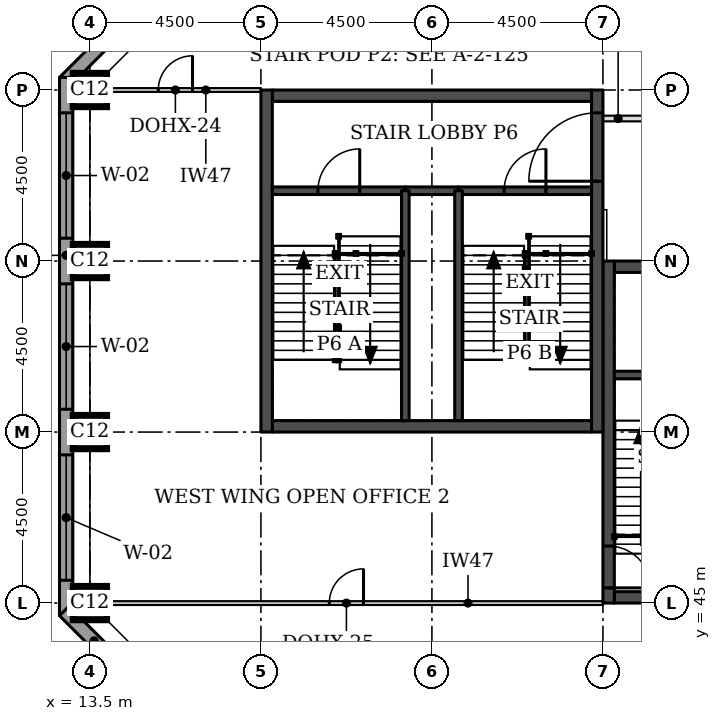
"""IFC4 building model, lengths in metres.
Left out: names, types, materials, properties, quantities, classifications, styles, units other than length and angle.
Written with IfcOpenShell. Run it as: python <this file> out.ifc"""

import sys

from ifc_helpers import new_model, si_unit, direction, frame, frame_2d, origin, origin_2d, place, context, subcontext, project, spatial, rectangle, extrude, element, fill, save


model = new_model("IFC4")
c1 = context("Model", 3, precision=1e-05, world=origin(), true_north=direction((0.0, 1.0)))
c2 = subcontext(c1, "Body", "Model", "MODEL_VIEW")
j1 = project(units=[si_unit("LENGTHUNIT", "METRE"), si_unit("PLANEANGLEUNIT", "RADIAN")], contexts=[c1])
p1 = place(None, origin())
s1 = spatial("IfcSite", under=j1, at=p1, CompositionType="ELEMENT")
p2 = place(p1, origin())
s2 = spatial("IfcBuilding", under=s1, at=p2, CompositionType="ELEMENT")
p3 = place(p2, frame((0.0, 0.0, 256.3)))
s3 = spatial("IfcBuildingStorey", under=s2, at=p3, CompositionType="ELEMENT", Elevation=256.3)
for number, where, z_axis, x_axis in (
    (1, (13.5, 45.0, 0.0), (0.0, 0.0, 1.0), (1.0, 0.0, 0.0)),
    (2, (13.5, 49.5, 0.0), (0.0, 0.0, 1.0), (1.0, 0.0, 0.0)),
    (3, (13.5, 54.0, 0.0), (0.0, 0.0, 1.0), (1.0, 0.0, 0.0)),
    (4, (13.5, 58.5, 0.0), (0.0, 0.0, 1.0), (1.0, 0.0, 0.0)),
):
    element("IfcColumn", number, at=place(p3, frame(where, z_axis=z_axis, x_axis=x_axis)), inside=s3, PredefinedType="COLUMN", context=c2, shape_type="SweptSolid", body=[
        extrude(rectangle(XDim=0.9, YDim=0.9, at=origin_2d()), origin(), (0.0, 0.0, 1.0), 3.7),
    ])
p4 = place(p3, frame((27.3, 45.15, 0.0), z_axis=(0.0, 0.0, 1.0), x_axis=(1.0, 0.0, 0.0)))
e5 = element("IfcWall", 5, at=p4, inside=s3, PredefinedType="SHEAR", context=c2, shape_type="SweptSolid", body=[
    extrude(rectangle(XDim=8.4, YDim=0.3, at=frame_2d((4.2, 0.0))), origin(), (0.0, 0.0, 1.0), 3.7),
])
p5 = place(p4, frame((5.2, 0.0, 0.0)))
e6 = element("IfcOpeningElement", 6, at=p5, cuts=e5, PredefinedType="OPENING", context=c2, shape_type="SweptSolid", body=[
    extrude(rectangle(XDim=1.0, YDim=2.1, at=frame_2d((0.5, 1.05))), frame((0.0, 0.16, 0.0), z_axis=(0.0, -1.0, 0.0), x_axis=(1.0, 0.0, 0.0)), (0.0, 0.0, 1.0), 0.32),
])
p6 = place(p3, frame((27.3, 53.85, 0.0), z_axis=(0.0, 0.0, 1.0), x_axis=(1.0, 0.0, 0.0)))
e7 = element("IfcWall", 7, at=p6, inside=s3, PredefinedType="SHEAR", context=c2, shape_type="SweptSolid", body=[
    extrude(rectangle(XDim=8.4, YDim=0.3, at=frame_2d((4.2, 0.0))), origin(), (0.0, 0.0, 1.0), 3.7),
])
p7 = place(p6, frame((6.4, 0.0, 0.0)))
e8 = element("IfcOpeningElement", 8, at=p7, cuts=e7, PredefinedType="OPENING", context=c2, shape_type="SweptSolid", body=[
    extrude(rectangle(XDim=1.1, YDim=2.1, at=frame_2d((0.55, 1.05))), frame((0.0, 0.16, 0.0), z_axis=(0.0, -1.0, 0.0), x_axis=(1.0, 0.0, 0.0)), (0.0, 0.0, 1.0), 0.32),
])
p8 = place(p3, frame((27.15, 45.0, 0.0), z_axis=(0.0, 0.0, 1.0), x_axis=(0.0, 1.0, 0.0)))
e9 = element("IfcWall", 9, at=p8, inside=s3, PredefinedType="SHEAR", context=c2, shape_type="SweptSolid", body=[
    extrude(rectangle(XDim=9.0, YDim=0.3, at=frame_2d((4.5, 0.0))), origin(), (0.0, 0.0, 1.0), 3.7),
])
p9 = place(p8, frame((0.4, 0.0, 0.0)))
e10 = element("IfcOpeningElement", 10, at=p9, cuts=e9, PredefinedType="OPENING", context=c2, shape_type="SweptSolid", body=[
    extrude(rectangle(XDim=1.1, YDim=2.1, at=frame_2d((0.55, 1.05))), frame((0.0, 0.16, 0.0), z_axis=(0.0, -1.0, 0.0), x_axis=(1.0, 0.0, 0.0)), (0.0, 0.0, 1.0), 0.32),
])
for number, where, z_axis, x_axis in (
    (11, (18.3, 49.65, 0.0), (0.0, 0.0, 1.0), (1.0, 0.0, 0.0)),
    (12, (18.3, 58.35, 0.0), (0.0, 0.0, 1.0), (1.0, 0.0, 0.0)),
):
    element("IfcWall", number, at=place(p3, frame(where, z_axis=z_axis, x_axis=x_axis)), inside=s3, PredefinedType="SHEAR", context=c2, shape_type="SweptSolid", body=[
        extrude(rectangle(XDim=8.4, YDim=0.3, at=frame_2d((4.2, 0.0))), origin(), (0.0, 0.0, 1.0), 3.7),
    ])
p10 = place(p3, frame((18.15, 49.5, 0.0), z_axis=(0.0, 0.0, 1.0), x_axis=(0.0, 1.0, 0.0)))
e13 = element("IfcWall", 13, at=p10, inside=s3, PredefinedType="SHEAR", context=c2, shape_type="SweptSolid", body=[
    extrude(rectangle(XDim=9.0, YDim=0.3, at=frame_2d((4.5, 0.0))), origin(), (0.0, 0.0, 1.0), 3.7),
])
p11 = place(p3, frame((26.85, 49.5, 0.0), z_axis=(0.0, 0.0, 1.0), x_axis=(0.0, 1.0, 0.0)))
e14 = element("IfcWall", 14, at=p11, inside=s3, PredefinedType="SHEAR", context=c2, shape_type="SweptSolid", body=[
    extrude(rectangle(XDim=9.0, YDim=0.3, at=frame_2d((4.5, 0.0))), origin(), (0.0, 0.0, 1.0), 3.7),
])
p12 = place(p11, frame((6.6, 0.0, 0.0)))
e15 = element("IfcOpeningElement", 15, at=p12, cuts=e14, PredefinedType="OPENING", context=c2, shape_type="SweptSolid", body=[
    extrude(rectangle(XDim=1.8, YDim=2.1, at=frame_2d((0.9, 1.05))), frame((0.0, 0.16, 0.0), z_axis=(0.0, -1.0, 0.0), x_axis=(1.0, 0.0, 0.0)), (0.0, 0.0, 1.0), 0.32),
])
p13 = place(p3, frame((17.792, 63.676, 0.0), z_axis=(0.0, 0.0, 1.0), x_axis=(-0.707106781187, -0.707106781187, 0.0)))
e16 = element("IfcWall", 16, at=p13, inside=s3, PredefinedType="STANDARD", context=c2, shape_type="SweptSolid", body=[
    extrude(rectangle(XDim=7.027, YDim=0.35, at=frame_2d((3.513, 0.0))), origin(), (0.0, 0.0, 1.0), 3.525),
])
p14 = place(p13, frame((1.863, 0.0, 0.9)))
e17 = element("IfcOpeningElement", 17, at=p14, cuts=e16, PredefinedType="OPENING", context=c2, shape_type="SweptSolid", body=[
    extrude(rectangle(XDim=3.3, YDim=1.9, at=frame_2d((1.65, 0.95))), frame((0.0, 0.185, 0.0), z_axis=(0.0, -1.0, 0.0), x_axis=(1.0, 0.0, 0.0)), (0.0, 0.0, 1.0), 0.37),
])
p15 = place(p3, frame((12.875, 58.831, 0.0), z_axis=(0.0, 0.0, 1.0), x_axis=(0.0, -1.0, 0.0)))
e18 = element("IfcWall", 18, at=p15, inside=s3, PredefinedType="STANDARD", context=c2, shape_type="SweptSolid", body=[
    extrude(rectangle(XDim=14.163, YDim=0.35, at=frame_2d((7.081, 0.0))), origin(), (0.0, 0.0, 1.0), 3.525),
])
p16 = place(p15, frame((0.931, 0.0, 0.9)))
e19 = element("IfcOpeningElement", 19, at=p16, cuts=e18, PredefinedType="OPENING", context=c2, shape_type="SweptSolid", body=[
    extrude(rectangle(XDim=3.3, YDim=1.9, at=frame_2d((1.65, 0.95))), frame((0.0, 0.185, 0.0), z_axis=(0.0, -1.0, 0.0), x_axis=(1.0, 0.0, 0.0)), (0.0, 0.0, 1.0), 0.37),
])
p17 = place(p15, frame((5.431, 0.0, 0.9)))
e20 = element("IfcOpeningElement", 20, at=p17, cuts=e18, PredefinedType="OPENING", context=c2, shape_type="SweptSolid", body=[
    extrude(rectangle(XDim=3.3, YDim=1.9, at=frame_2d((1.65, 0.95))), frame((0.0, 0.185, 0.0), z_axis=(0.0, -1.0, 0.0), x_axis=(1.0, 0.0, 0.0)), (0.0, 0.0, 1.0), 0.37),
])
p18 = place(p15, frame((9.931, 0.0, 0.9)))
e21 = element("IfcOpeningElement", 21, at=p18, cuts=e18, PredefinedType="OPENING", context=c2, shape_type="SweptSolid", body=[
    extrude(rectangle(XDim=3.3, YDim=1.9, at=frame_2d((1.65, 0.95))), frame((0.0, 0.185, 0.0), z_axis=(0.0, -1.0, 0.0), x_axis=(1.0, 0.0, 0.0)), (0.0, 0.0, 1.0), 0.37),
])
p19 = place(p3, frame((12.824, 44.792, 0.0), z_axis=(0.0, 0.0, 1.0), x_axis=(0.707106781187, -0.707106781187, 0.0)))
e22 = element("IfcWall", 22, at=p19, inside=s3, PredefinedType="STANDARD", context=c2, shape_type="SweptSolid", body=[
    extrude(rectangle(XDim=7.027, YDim=0.35, at=frame_2d((3.513, 0.0))), origin(), (0.0, 0.0, 1.0), 3.525),
])
p20 = place(p19, frame((1.863, 0.0, 0.9)))
e23 = element("IfcOpeningElement", 23, at=p20, cuts=e22, PredefinedType="OPENING", context=c2, shape_type="SweptSolid", body=[
    extrude(rectangle(XDim=3.3, YDim=1.9, at=frame_2d((1.65, 0.95))), frame((0.0, 0.185, 0.0), z_axis=(0.0, -1.0, 0.0), x_axis=(1.0, 0.0, 0.0)), (0.0, 0.0, 1.0), 0.37),
])
p21 = place(p3, frame((13.5, 58.5, 0.0), z_axis=(0.0, 0.0, 1.0), x_axis=(1.0, 0.0, 0.0)))
e24 = element("IfcWall", 24, at=p21, inside=s3, PredefinedType="PARTITIONING", context=c2, shape_type="SweptSolid", body=[
    extrude(rectangle(XDim=4.5, YDim=0.1, at=frame_2d((2.25, 0.0))), origin(), (0.0, 0.0, 1.0), 2.55),
])
p22 = place(p21, frame((1.8, 0.0, 0.0)))
e25 = element("IfcOpeningElement", 25, at=p22, cuts=e24, PredefinedType="OPENING", context=c2, shape_type="SweptSolid", body=[
    extrude(rectangle(XDim=0.9, YDim=2.1, at=frame_2d((0.45, 1.05))), frame((0.0, 0.06, 0.0), z_axis=(0.0, -1.0, 0.0), x_axis=(1.0, 0.0, 0.0)), (0.0, 0.0, 1.0), 0.12),
])
p23 = place(p3, frame((13.5, 45.0, 0.0), z_axis=(0.0, 0.0, 1.0), x_axis=(1.0, 0.0, 0.0)))
e26 = element("IfcWall", 26, at=p23, inside=s3, PredefinedType="PARTITIONING", context=c2, shape_type="SweptSolid", body=[
    extrude(rectangle(XDim=13.5, YDim=0.1, at=frame_2d((6.75, 0.0))), origin(), (0.0, 0.0, 1.0), 2.55),
])
p24 = place(p23, frame((6.3, 0.0, 0.0)))
e27 = element("IfcOpeningElement", 27, at=p24, cuts=e26, PredefinedType="OPENING", context=c2, shape_type="SweptSolid", body=[
    extrude(rectangle(XDim=0.9, YDim=2.1, at=frame_2d((0.45, 1.05))), frame((0.0, 0.06, 0.0), z_axis=(0.0, -1.0, 0.0), x_axis=(1.0, 0.0, 0.0)), (0.0, 0.0, 1.0), 0.12),
])
p25 = place(p3, frame((27.0, 57.75, 0.0), z_axis=(0.0, 0.0, 1.0), x_axis=(1.0, 0.0, 0.0)))
e28 = element("IfcWall", 28, at=p25, inside=s3, PredefinedType="PARTITIONING", context=c2, shape_type="SweptSolid", body=[
    extrude(rectangle(XDim=2.4, YDim=0.15, at=frame_2d((1.2, 0.0))), origin(), (0.0, 0.0, 1.0), 3.55),
])
p26 = place(p3, frame((27.3, 51.0, 0.0), z_axis=(0.0, 0.0, 1.0), x_axis=(1.0, 0.0, 0.0)))
e29 = element("IfcWall", 29, at=p26, inside=s3, PredefinedType="SOLIDWALL", context=c2, shape_type="SweptSolid", body=[
    extrude(rectangle(XDim=3.0, YDim=0.2, at=frame_2d((1.5, 0.0))), origin(), (0.0, 0.0, 1.0), 3.55),
])
p27 = place(p3, frame((21.8, 55.85, 0.0), z_axis=(0.0, 0.0, 1.0), x_axis=(1.0, 0.0, 0.0)))
e30 = element("IfcWall", 30, at=p27, inside=s3, PredefinedType="SOLIDWALL", context=c2, shape_type="SweptSolid", body=[
    extrude(rectangle(XDim=1.4, YDim=0.2, at=frame_2d((0.7, 0.0))), origin(), (0.0, 0.0, 1.0), 3.55),
])
p28 = place(p3, frame((18.3, 55.85, 0.0), z_axis=(0.0, 0.0, 1.0), x_axis=(1.0, 0.0, 0.0)))
e31 = element("IfcWall", 31, at=p28, inside=s3, PredefinedType="SOLIDWALL", context=c2, shape_type="SweptSolid", body=[
    extrude(rectangle(XDim=3.5, YDim=0.2, at=frame_2d((1.75, 0.0))), origin(), (0.0, 0.0, 1.0), 3.55),
])
p29 = place(p28, frame((1.2, 0.0, 0.0)))
e32 = element("IfcOpeningElement", 32, at=p29, cuts=e31, PredefinedType="OPENING", context=c2, shape_type="SweptSolid", body=[
    extrude(rectangle(XDim=1.1, YDim=2.1, at=frame_2d((0.55, 1.05))), frame((0.0, 0.11, 0.0), z_axis=(0.0, -1.0, 0.0), x_axis=(1.0, 0.0, 0.0)), (0.0, 0.0, 1.0), 0.22),
])
p30 = place(p3, frame((23.2, 55.85, 0.0), z_axis=(0.0, 0.0, 1.0), x_axis=(1.0, 0.0, 0.0)))
e33 = element("IfcWall", 33, at=p30, inside=s3, PredefinedType="SOLIDWALL", context=c2, shape_type="SweptSolid", body=[
    extrude(rectangle(XDim=3.5, YDim=0.2, at=frame_2d((1.75, 0.0))), origin(), (0.0, 0.0, 1.0), 3.55),
])
p31 = place(p30, frame((1.2, 0.0, 0.0)))
e34 = element("IfcOpeningElement", 34, at=p31, cuts=e33, PredefinedType="OPENING", context=c2, shape_type="SweptSolid", body=[
    extrude(rectangle(XDim=1.1, YDim=2.1, at=frame_2d((0.55, 1.05))), frame((0.0, 0.11, 0.0), z_axis=(0.0, -1.0, 0.0), x_axis=(1.0, 0.0, 0.0)), (0.0, 0.0, 1.0), 0.22),
])
for number, where, z_axis, x_axis in (
    (35, (21.8, 49.8, 0.0), (0.0, 0.0, 1.0), (0.0, 1.0, 0.0)),
    (36, (23.2, 49.8, 0.0), (0.0, 0.0, 1.0), (0.0, 1.0, 0.0)),
):
    element("IfcWall", number, at=place(p3, frame(where, z_axis=z_axis, x_axis=x_axis)), inside=s3, PredefinedType="SOLIDWALL", context=c2, shape_type="SweptSolid", body=[
        extrude(rectangle(XDim=6.05, YDim=0.2, at=frame_2d((3.025, 0.0))), origin(), (0.0, 0.0, 1.0), 3.55),
    ])
p32 = place(p16, origin())
e37 = element("IfcWindow", 37, at=p32, inside=s3, PartitioningType="SINGLE_PANEL", PredefinedType="WINDOW", context=c2, shape_type="SweptSolid", body=[
    extrude(rectangle(XDim=3.3, YDim=1.9, at=frame_2d((1.65, 0.95))), frame((0.0, 0.085, 0.0), z_axis=(0.0, -1.0, 0.0), x_axis=(1.0, 0.0, 0.0)), (0.0, 0.0, 1.0), 0.06),
])
fill(e19, e37)
p33 = place(p17, origin())
e38 = element("IfcWindow", 38, at=p33, inside=s3, PartitioningType="SINGLE_PANEL", PredefinedType="WINDOW", context=c2, shape_type="SweptSolid", body=[
    extrude(rectangle(XDim=3.3, YDim=1.9, at=frame_2d((1.65, 0.95))), frame((0.0, 0.085, 0.0), z_axis=(0.0, -1.0, 0.0), x_axis=(1.0, 0.0, 0.0)), (0.0, 0.0, 1.0), 0.06),
])
fill(e20, e38)
p34 = place(p18, origin())
e39 = element("IfcWindow", 39, at=p34, inside=s3, PartitioningType="SINGLE_PANEL", PredefinedType="WINDOW", context=c2, shape_type="SweptSolid", body=[
    extrude(rectangle(XDim=3.3, YDim=1.9, at=frame_2d((1.65, 0.95))), frame((0.0, 0.085, 0.0), z_axis=(0.0, -1.0, 0.0), x_axis=(1.0, 0.0, 0.0)), (0.0, 0.0, 1.0), 0.06),
])
fill(e21, e39)
p35 = place(p22, origin())
e40 = element("IfcDoor", 40, at=p35, inside=s3, OperationType="SINGLE_SWING_RIGHT", PredefinedType="DOOR", context=c2, shape_type="SweptSolid", body=[
    extrude(rectangle(XDim=0.9, YDim=2.1, at=frame_2d((0.45, 1.05))), frame((0.0, 0.025, 0.0), z_axis=(0.0, -1.0, 0.0), x_axis=(1.0, 0.0, 0.0)), (0.0, 0.0, 1.0), 0.05),
])
fill(e25, e40)
p36 = place(p24, origin())
e41 = element("IfcDoor", 41, at=p36, inside=s3, OperationType="SINGLE_SWING_RIGHT", PredefinedType="DOOR", context=c2, shape_type="SweptSolid", body=[
    extrude(rectangle(XDim=0.9, YDim=2.1, at=frame_2d((0.45, 1.05))), frame((0.0, 0.025, 0.0), z_axis=(0.0, -1.0, 0.0), x_axis=(1.0, 0.0, 0.0)), (0.0, 0.0, 1.0), 0.05),
])
fill(e27, e41)
p37 = place(p9, frame((1.1, 0.0, 0.0), z_axis=(0.0, 0.0, 1.0), x_axis=(-1.0, 0.0, 0.0)))
e42 = element("IfcDoor", 42, at=p37, inside=s3, OperationType="SINGLE_SWING_RIGHT", PredefinedType="DOOR", context=c2, shape_type="SweptSolid", body=[
    extrude(rectangle(XDim=1.1, YDim=2.1, at=frame_2d((0.55, 1.05))), frame((0.0, 0.025, 0.0), z_axis=(0.0, -1.0, 0.0), x_axis=(1.0, 0.0, 0.0)), (0.0, 0.0, 1.0), 0.05),
])
fill(e10, e42)
p38 = place(p29, origin())
e43 = element("IfcDoor", 43, at=p38, inside=s3, OperationType="SINGLE_SWING_RIGHT", PredefinedType="DOOR", context=c2, shape_type="SweptSolid", body=[
    extrude(rectangle(XDim=1.1, YDim=2.1, at=frame_2d((0.55, 1.05))), frame((0.0, 0.025, 0.0), z_axis=(0.0, -1.0, 0.0), x_axis=(1.0, 0.0, 0.0)), (0.0, 0.0, 1.0), 0.05),
])
fill(e32, e43)
p39 = place(p31, origin())
e44 = element("IfcDoor", 44, at=p39, inside=s3, OperationType="SINGLE_SWING_RIGHT", PredefinedType="DOOR", context=c2, shape_type="SweptSolid", body=[
    extrude(rectangle(XDim=1.1, YDim=2.1, at=frame_2d((0.55, 1.05))), frame((0.0, 0.025, 0.0), z_axis=(0.0, -1.0, 0.0), x_axis=(1.0, 0.0, 0.0)), (0.0, 0.0, 1.0), 0.05),
])
fill(e34, e44)
p40 = place(p12, origin())
e45 = element("IfcDoor", 45, at=p40, inside=s3, OperationType="SINGLE_SWING_LEFT", PredefinedType="DOOR", context=c2, shape_type="SweptSolid", body=[
    extrude(rectangle(XDim=1.8, YDim=2.1, at=frame_2d((0.9, 1.05))), frame((0.0, 0.025, 0.0), z_axis=(0.0, -1.0, 0.0), x_axis=(1.0, 0.0, 0.0)), (0.0, 0.0, 1.0), 0.05),
])
fill(e15, e45)
save(model, sys.argv[1])
